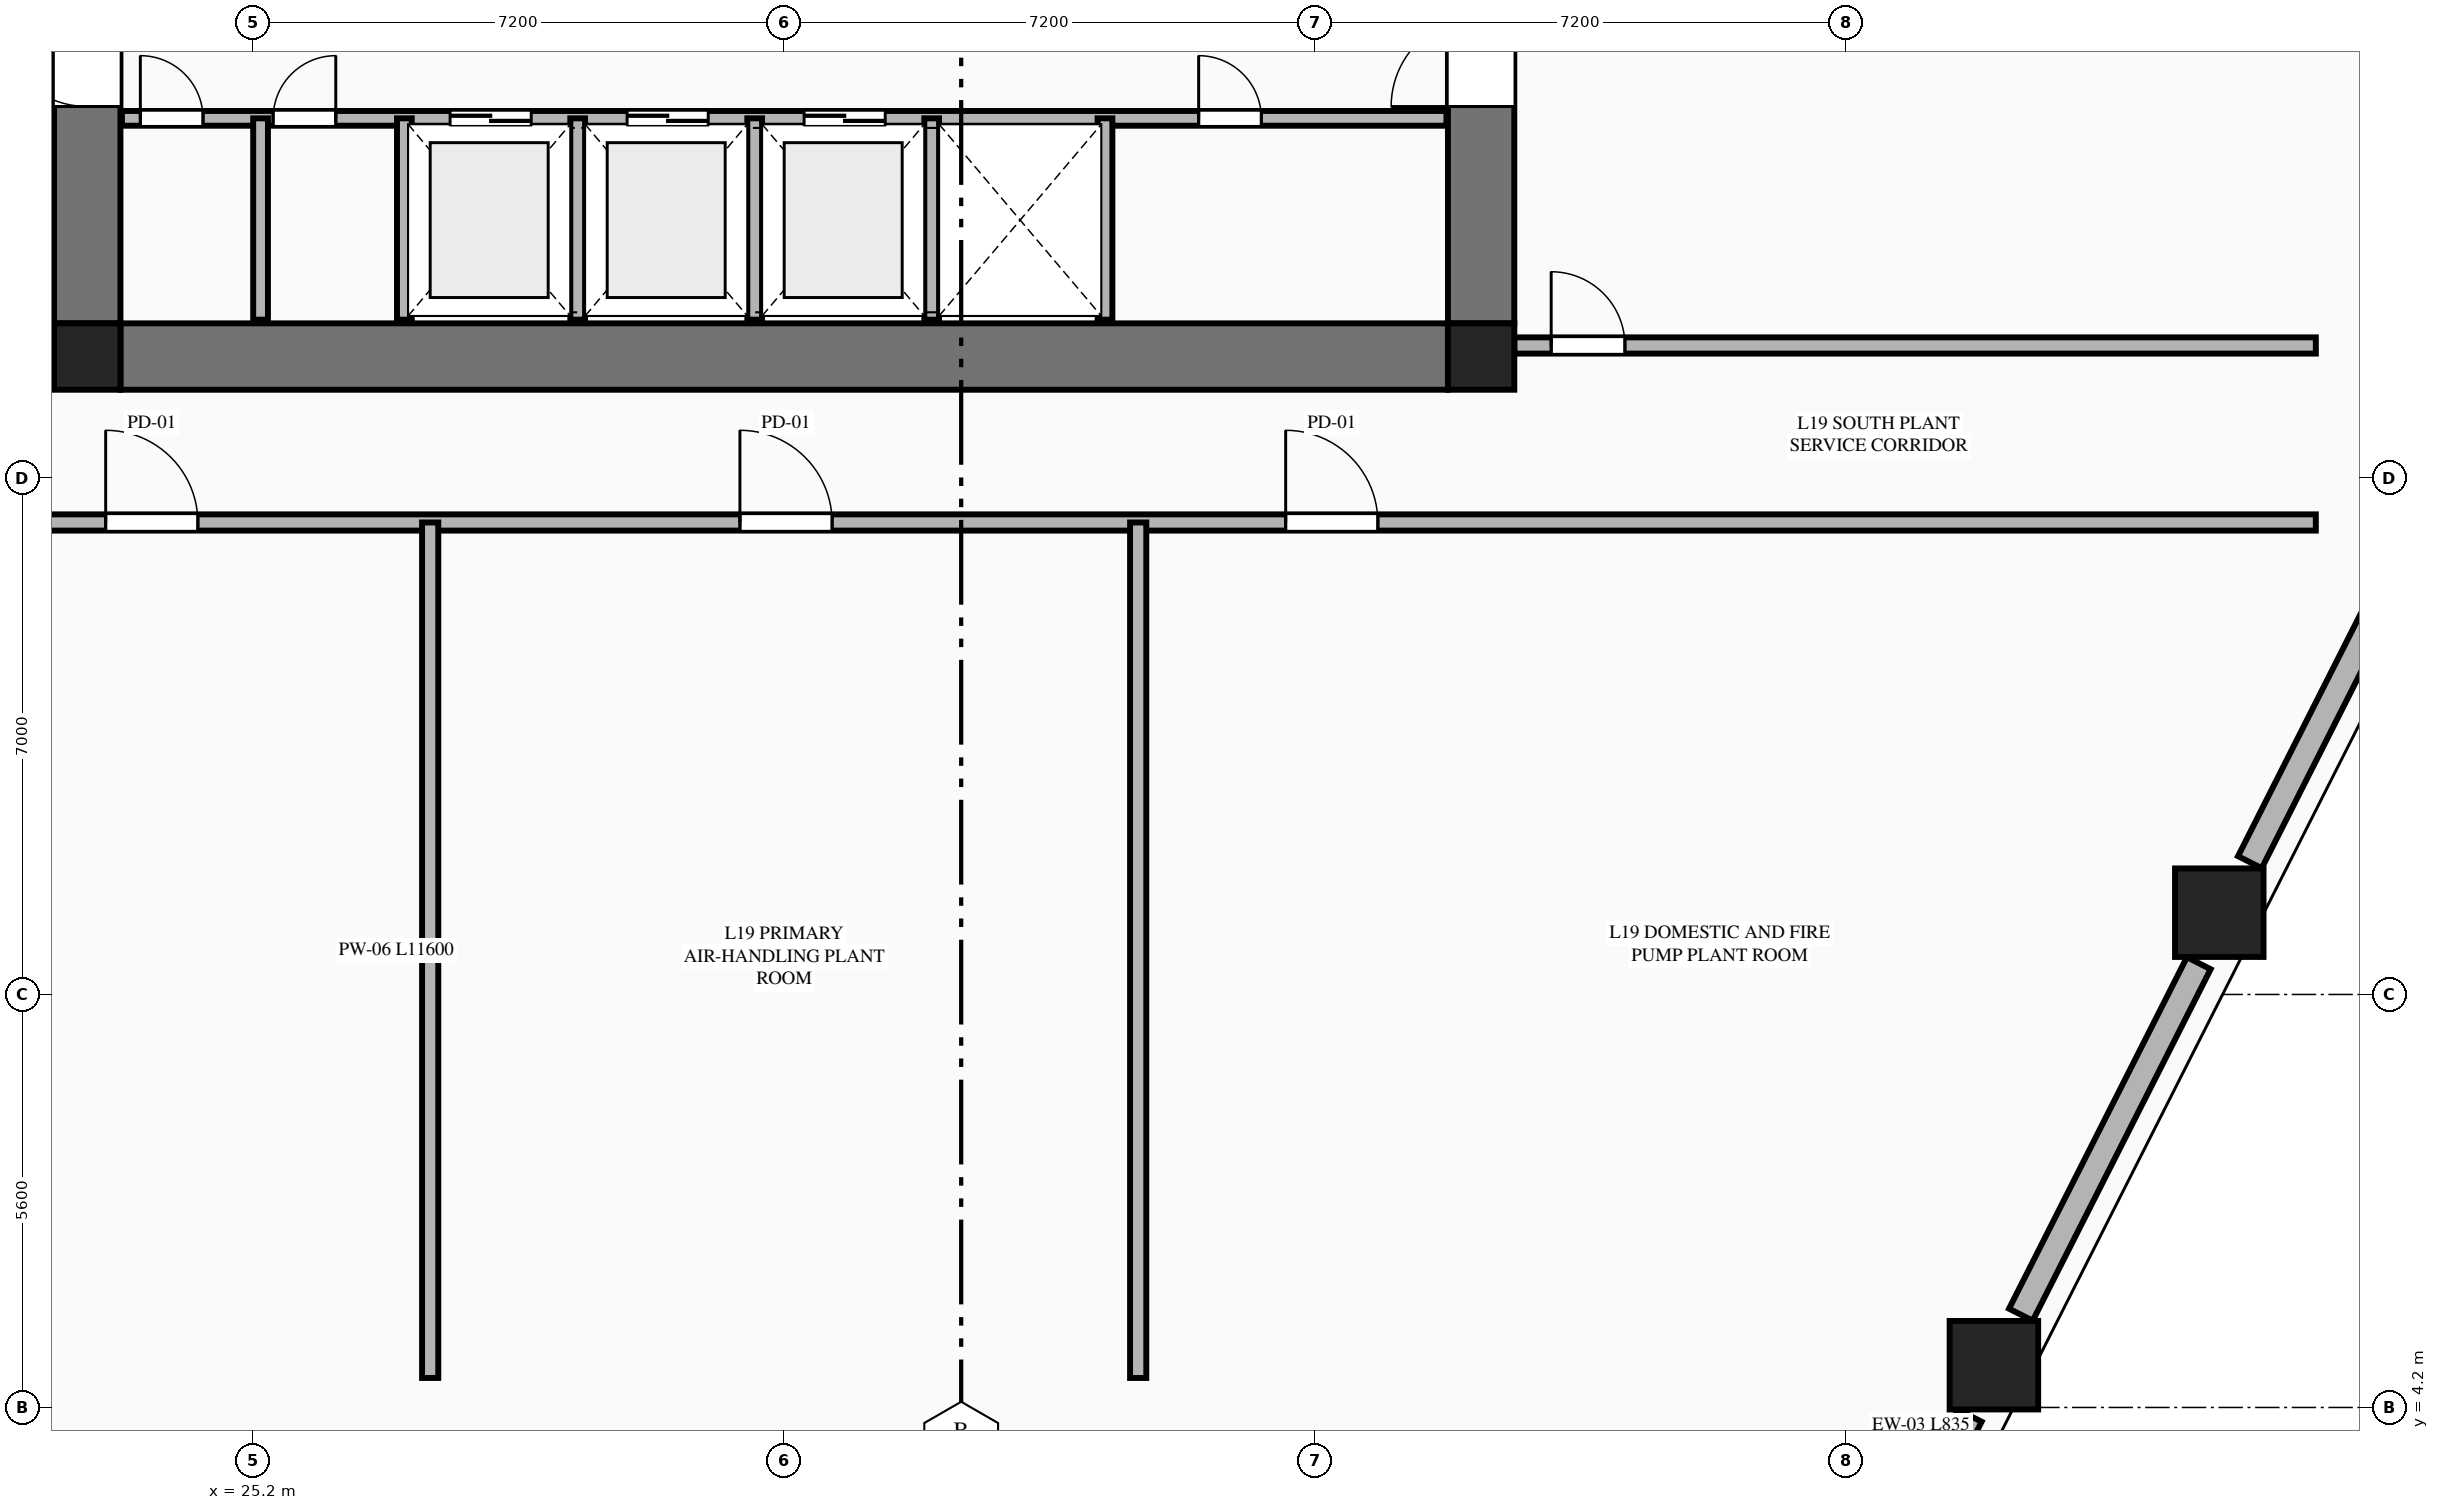
"""IFC4 building model, lengths in metres.
Left out: names, types, materials, properties, quantities, classifications, styles, units other than length and angle.
Written with IfcOpenShell. Run it as: python <this file> out.ifc"""

import sys

from ifc_helpers import new_model, si_unit, direction, frame, frame_2d, origin, origin_2d, place, context, subcontext, project, spatial, rectangle, extrude, element, fill, save


model = new_model("IFC4")
c1 = context("Model", 3, precision=1e-05, world=origin(), true_north=direction((0.0, 1.0)))
c2 = subcontext(c1, "Body", "Model", "MODEL_VIEW")
j1 = project(units=[si_unit("LENGTHUNIT", "METRE"), si_unit("PLANEANGLEUNIT", "RADIAN")], contexts=[c1])
p1 = place(None, origin())
s1 = spatial("IfcSite", under=j1, at=p1, CompositionType="ELEMENT")
p2 = place(p1, origin())
s2 = spatial("IfcBuilding", under=s1, at=p2, CompositionType="ELEMENT")
p3 = place(p2, frame((0.0, 0.0, 74.6)))
s3 = spatial("IfcBuildingStorey", under=s2, at=p3, CompositionType="ELEMENT", Elevation=74.6)
for number, where, z_axis, x_axis in (
    (1, (22.95, 18.45, 0.0), (0.0, 0.0, 1.0), (1.0, 0.0, 0.0)),
    (2, (41.85, 18.45, 0.0), (0.0, 0.0, 1.0), (1.0, 0.0, 0.0)),
):
    element("IfcColumn", number, at=place(p3, frame(where, z_axis=z_axis, x_axis=x_axis)), inside=s3, PredefinedType="COLUMN", context=c2, shape_type="SweptSolid", body=[
        extrude(rectangle(XDim=0.9, YDim=0.9, at=origin_2d()), origin(), (0.0, 0.0, 1.0), 5.4),
    ])
p4 = place(p3, frame((23.4, 18.45, 0.0), z_axis=(0.0, 0.0, 1.0), x_axis=(1.0, 0.0, 0.0)))
e3 = element("IfcWall", 3, at=p4, inside=s3, PredefinedType="SHEAR", context=c2, shape_type="SweptSolid", body=[
    extrude(rectangle(XDim=18.0, YDim=0.9, at=frame_2d((9.0, 0.0))), origin(), (0.0, 0.0, 1.0), 5.18),
])
p5 = place(p3, frame((22.95, 18.9, 0.0), z_axis=(0.0, 0.0, 1.0), x_axis=(0.0, 1.0, 0.0)))
e4 = element("IfcWall", 4, at=p5, inside=s3, PredefinedType="SHEAR", context=c2, shape_type="SweptSolid", body=[
    extrude(rectangle(XDim=14.0, YDim=0.9, at=frame_2d((7.0, 0.0))), origin(), (0.0, 0.0, 1.0), 5.18),
])
p6 = place(p5, frame((2.94, 0.0, 0.0)))
e5 = element("IfcOpeningElement", 5, at=p6, cuts=e4, PredefinedType="OPENING", context=c2, shape_type="SweptSolid", body=[
    extrude(rectangle(XDim=1.22, YDim=2.25, at=frame_2d((0.61, 1.125))), frame((0.0, 0.46, 0.0), z_axis=(0.0, -1.0, 0.0), x_axis=(1.0, 0.0, 0.0)), (0.0, 0.0, 1.0), 0.92),
])
p7 = place(p3, frame((41.85, 18.9, 0.0), z_axis=(0.0, 0.0, 1.0), x_axis=(0.0, 1.0, 0.0)))
e6 = element("IfcWall", 6, at=p7, inside=s3, PredefinedType="SHEAR", context=c2, shape_type="SweptSolid", body=[
    extrude(rectangle(XDim=14.0, YDim=0.9, at=frame_2d((7.0, 0.0))), origin(), (0.0, 0.0, 1.0), 5.18),
])
p8 = place(p7, frame((2.94, 0.0, 0.0)))
e7 = element("IfcOpeningElement", 7, at=p8, cuts=e6, PredefinedType="OPENING", context=c2, shape_type="SweptSolid", body=[
    extrude(rectangle(XDim=1.22, YDim=2.25, at=frame_2d((0.61, 1.125))), frame((0.0, 0.46, 0.0), z_axis=(0.0, -1.0, 0.0), x_axis=(1.0, 0.0, 0.0)), (0.0, 0.0, 1.0), 0.92),
])
for number, where, z_axis, x_axis in (
    (8, (48.803, 4.773, 0.0), (0.0, 0.0, 1.0), (1.0, 0.0, 0.0)),
    (9, (51.859, 10.909, 0.0), (0.0, 0.0, 1.0), (1.0, 0.0, 0.0)),
):
    element("IfcColumn", number, at=place(p3, frame(where, z_axis=z_axis, x_axis=x_axis)), inside=s3, PredefinedType="COLUMN", context=c2, shape_type="SweptSolid", body=[
        extrude(rectangle(XDim=1.2, YDim=1.2, at=origin_2d()), origin(), (0.0, 0.0, 1.0), 5.4),
    ])
p9 = place(p3, frame((23.42, 21.68, 0.0), z_axis=(0.0, 0.0, 1.0), x_axis=(1.0, 0.0, 0.0)))
e10 = element("IfcWall", 10, at=p9, inside=s3, PredefinedType="PLUMBINGWALL", context=c2, shape_type="SweptSolid", body=[
    extrude(rectangle(XDim=17.96, YDim=0.2, at=frame_2d((8.98, 0.0))), origin(), (0.0, 0.0, 1.0), 5.18),
])
p10 = place(p9, frame((4.45, 0.0, 0.0)))
e11 = element("IfcOpeningElement", 11, at=p10, cuts=e10, PredefinedType="OPENING", context=c2, shape_type="SweptSolid", body=[
    extrude(rectangle(XDim=1.1, YDim=2.2, at=frame_2d((0.55, 1.1))), frame((0.0, 0.11, 0.0), z_axis=(0.0, -1.0, 0.0), x_axis=(1.0, 0.0, 0.0)), (0.0, 0.0, 1.0), 0.22),
])
p11 = place(p9, frame((6.85, 0.0, 0.0)))
e12 = element("IfcOpeningElement", 12, at=p11, cuts=e10, PredefinedType="OPENING", context=c2, shape_type="SweptSolid", body=[
    extrude(rectangle(XDim=1.1, YDim=2.2, at=frame_2d((0.55, 1.1))), frame((0.0, 0.11, 0.0), z_axis=(0.0, -1.0, 0.0), x_axis=(1.0, 0.0, 0.0)), (0.0, 0.0, 1.0), 0.22),
])
p12 = place(p9, frame((9.25, 0.0, 0.0)))
e13 = element("IfcOpeningElement", 13, at=p12, cuts=e10, PredefinedType="OPENING", context=c2, shape_type="SweptSolid", body=[
    extrude(rectangle(XDim=1.1, YDim=2.2, at=frame_2d((0.55, 1.1))), frame((0.0, 0.11, 0.0), z_axis=(0.0, -1.0, 0.0), x_axis=(1.0, 0.0, 0.0)), (0.0, 0.0, 1.0), 0.22),
])
p13 = place(p9, frame((0.25, 0.0, 0.0)))
e14 = element("IfcOpeningElement", 14, at=p13, cuts=e10, PredefinedType="OPENING", context=c2, shape_type="SweptSolid", body=[
    extrude(rectangle(XDim=0.85, YDim=2.05, at=frame_2d((0.425, 1.025))), frame((0.0, 0.11, 0.0), z_axis=(0.0, -1.0, 0.0), x_axis=(1.0, 0.0, 0.0)), (0.0, 0.0, 1.0), 0.22),
])
p14 = place(p9, frame((2.05, 0.0, 0.0)))
e15 = element("IfcOpeningElement", 15, at=p14, cuts=e10, PredefinedType="OPENING", context=c2, shape_type="SweptSolid", body=[
    extrude(rectangle(XDim=0.85, YDim=2.05, at=frame_2d((0.425, 1.025))), frame((0.0, 0.11, 0.0), z_axis=(0.0, -1.0, 0.0), x_axis=(1.0, 0.0, 0.0)), (0.0, 0.0, 1.0), 0.22),
])
p15 = place(p9, frame((14.6, 0.0, 0.0)))
e16 = element("IfcOpeningElement", 16, at=p15, cuts=e10, PredefinedType="OPENING", context=c2, shape_type="SweptSolid", body=[
    extrude(rectangle(XDim=0.85, YDim=2.05, at=frame_2d((0.425, 1.025))), frame((0.0, 0.11, 0.0), z_axis=(0.0, -1.0, 0.0), x_axis=(1.0, 0.0, 0.0)), (0.0, 0.0, 1.0), 0.22),
])
for number, where, z_axis, x_axis in (
    (17, (27.25, 18.95, 0.0), (0.0, 0.0, 1.0), (0.0, 1.0, 0.0)),
    (18, (29.6, 18.95, 0.0), (0.0, 0.0, 1.0), (0.0, 1.0, 0.0)),
    (19, (32.0, 18.95, 0.0), (0.0, 0.0, 1.0), (0.0, 1.0, 0.0)),
    (20, (34.4, 18.95, 0.0), (0.0, 0.0, 1.0), (0.0, 1.0, 0.0)),
    (21, (36.75, 18.95, 0.0), (0.0, 0.0, 1.0), (0.0, 1.0, 0.0)),
    (22, (25.3, 18.95, 0.0), (0.0, 0.0, 1.0), (0.0, 1.0, 0.0)),
):
    element("IfcWall", number, at=place(p3, frame(where, z_axis=z_axis, x_axis=x_axis)), inside=s3, PredefinedType="PLUMBINGWALL", context=c2, shape_type="SweptSolid", body=[
        extrude(rectangle(XDim=2.73, YDim=0.2, at=frame_2d((1.365, 0.0))), origin(), (0.0, 0.0, 1.0), 5.18),
    ])
p16 = place(p3, frame((11.632, 18.6, 0.0), z_axis=(0.0, 0.0, 1.0), x_axis=(1.0, 0.0, 0.0)))
e23 = element("IfcWall", 23, at=p16, inside=s3, PredefinedType="PARTITIONING", context=c2, shape_type="SweptSolid", body=[
    extrude(rectangle(XDim=10.868, YDim=0.22, at=frame_2d((5.434, 0.0))), origin(), (0.0, 0.0, 1.0), 4.487),
])
p17 = place(p16, frame((8.668, 0.0, 0.0)))
e24 = element("IfcOpeningElement", 24, at=p17, cuts=e23, PredefinedType="OPENING", context=c2, shape_type="SweptSolid", body=[
    extrude(rectangle(XDim=1.0, YDim=2.15, at=frame_2d((0.5, 1.075))), frame((0.0, 0.12, 0.0), z_axis=(0.0, -1.0, 0.0), x_axis=(1.0, 0.0, 0.0)), (0.0, 0.0, 1.0), 0.24),
])
p18 = place(p3, frame((42.3, 18.6, 0.0), z_axis=(0.0, 0.0, 1.0), x_axis=(1.0, 0.0, 0.0)))
e25 = element("IfcWall", 25, at=p18, inside=s3, PredefinedType="PARTITIONING", context=c2, shape_type="SweptSolid", body=[
    extrude(rectangle(XDim=10.868, YDim=0.22, at=frame_2d((5.434, 0.0))), origin(), (0.0, 0.0, 1.0), 4.487),
])
p19 = place(p18, frame((0.5, 0.0, 0.0)))
e26 = element("IfcOpeningElement", 26, at=p19, cuts=e25, PredefinedType="OPENING", context=c2, shape_type="SweptSolid", body=[
    extrude(rectangle(XDim=1.0, YDim=2.15, at=frame_2d((0.5, 1.075))), frame((0.0, 0.12, 0.0), z_axis=(0.0, -1.0, 0.0), x_axis=(1.0, 0.0, 0.0)), (0.0, 0.0, 1.0), 0.24),
])
p20 = place(p3, frame((11.632, 16.2, 0.0), z_axis=(0.0, 0.0, 1.0), x_axis=(1.0, 0.0, 0.0)))
e27 = element("IfcWall", 27, at=p20, inside=s3, PredefinedType="PARTITIONING", context=c2, shape_type="SweptSolid", body=[
    extrude(rectangle(XDim=41.536, YDim=0.22, at=frame_2d((20.768, 0.0))), origin(), (0.0, 0.0, 1.0), 5.18),
])
p21 = place(p20, frame((11.568, 0.0, 0.0)))
e28 = element("IfcOpeningElement", 28, at=p21, cuts=e27, PredefinedType="OPENING", context=c2, shape_type="SweptSolid", body=[
    extrude(rectangle(XDim=1.25, YDim=2.25, at=frame_2d((0.625, 1.125))), frame((0.0, 0.12, 0.0), z_axis=(0.0, -1.0, 0.0), x_axis=(1.0, 0.0, 0.0)), (0.0, 0.0, 1.0), 0.24),
])
p22 = place(p20, frame((20.168, 0.0, 0.0)))
e29 = element("IfcOpeningElement", 29, at=p22, cuts=e27, PredefinedType="OPENING", context=c2, shape_type="SweptSolid", body=[
    extrude(rectangle(XDim=1.25, YDim=2.25, at=frame_2d((0.625, 1.125))), frame((0.0, 0.12, 0.0), z_axis=(0.0, -1.0, 0.0), x_axis=(1.0, 0.0, 0.0)), (0.0, 0.0, 1.0), 0.24),
])
p23 = place(p20, frame((27.568, 0.0, 0.0)))
e30 = element("IfcOpeningElement", 30, at=p23, cuts=e27, PredefinedType="OPENING", context=c2, shape_type="SweptSolid", body=[
    extrude(rectangle(XDim=1.25, YDim=2.25, at=frame_2d((0.625, 1.125))), frame((0.0, 0.12, 0.0), z_axis=(0.0, -1.0, 0.0), x_axis=(1.0, 0.0, 0.0)), (0.0, 0.0, 1.0), 0.24),
])
for number, where, z_axis, x_axis in (
    (31, (27.6, 4.6, 0.0), (0.0, 0.0, 1.0), (0.0, 1.0, 0.0)),
    (32, (37.2, 4.6, 0.0), (0.0, 0.0, 1.0), (0.0, 1.0, 0.0)),
):
    element("IfcWall", number, at=place(p3, frame(where, z_axis=z_axis, x_axis=x_axis)), inside=s3, PredefinedType="PARTITIONING", context=c2, shape_type="SweptSolid", body=[
        extrude(rectangle(XDim=11.6, YDim=0.22, at=frame_2d((5.8, 0.0))), origin(), (0.0, 0.0, 1.0), 5.18),
    ])
p24 = place(p3, frame((48.099, 3.343, 0.0), z_axis=(0.0, 0.0, 1.0), x_axis=(0.45153655953, 0.892252618605, 0.0)))
e33 = element("IfcWall", 33, at=p24, inside=s3, PredefinedType="STANDARD", context=c2, shape_type="SweptSolid", body=[
    extrude(rectangle(XDim=0.835, YDim=0.36, at=frame_2d((0.417, 0.0))), origin(), (0.0, 0.0, 1.0), 5.18),
])
p25 = place(p3, frame((49.169, 5.458, 0.0), z_axis=(0.0, 0.0, 1.0), x_axis=(0.451559361714, 0.892241078884, 0.0)))
e34 = element("IfcWall", 34, at=p25, inside=s3, PredefinedType="STANDARD", context=c2, shape_type="SweptSolid", body=[
    extrude(rectangle(XDim=5.342, YDim=0.36, at=frame_2d((2.671, 0.0))), origin(), (0.0, 0.0, 1.0), 4.637),
])
p26 = place(p3, frame((52.274, 11.594, 0.0), z_axis=(0.0, 0.0, 1.0), x_axis=(0.451476366852, 0.892283077378, 0.0)))
e35 = element("IfcWall", 35, at=p26, inside=s3, PredefinedType="STANDARD", context=c2, shape_type="SweptSolid", body=[
    extrude(rectangle(XDim=5.537, YDim=0.36, at=frame_2d((2.769, 0.0))), origin(), (0.0, 0.0, 1.0), 4.637),
])
p27 = place(p6, origin())
e36 = element("IfcDoor", 36, at=p27, inside=s3, OperationType="SINGLE_SWING_RIGHT", PredefinedType="DOOR", context=c2, shape_type="SweptSolid", body=[
    extrude(rectangle(XDim=1.22, YDim=2.25, at=frame_2d((0.61, 1.125))), frame((0.0, 0.025, 0.0), z_axis=(0.0, -1.0, 0.0), x_axis=(1.0, 0.0, 0.0)), (0.0, 0.0, 1.0), 0.05),
])
fill(e5, e36)
p28 = place(p8, origin())
e37 = element("IfcDoor", 37, at=p28, inside=s3, OperationType="SINGLE_SWING_LEFT", PredefinedType="DOOR", context=c2, shape_type="SweptSolid", body=[
    extrude(rectangle(XDim=1.22, YDim=2.25, at=frame_2d((0.61, 1.125))), frame((0.0, 0.025, 0.0), z_axis=(0.0, -1.0, 0.0), x_axis=(1.0, 0.0, 0.0)), (0.0, 0.0, 1.0), 0.05),
])
fill(e7, e37)
p29 = place(p10, origin())
e38 = element("IfcDoor", 38, at=p29, inside=s3, OperationType="DOUBLE_DOOR_SLIDING", PredefinedType="DOOR", context=c2, shape_type="SweptSolid", body=[
    extrude(rectangle(XDim=1.1, YDim=2.2, at=frame_2d((0.55, 1.1))), frame((0.0, 0.025, 0.0), z_axis=(0.0, -1.0, 0.0), x_axis=(1.0, 0.0, 0.0)), (0.0, 0.0, 1.0), 0.05),
])
fill(e11, e38)
p30 = place(p11, origin())
e39 = element("IfcDoor", 39, at=p30, inside=s3, OperationType="DOUBLE_DOOR_SLIDING", PredefinedType="DOOR", context=c2, shape_type="SweptSolid", body=[
    extrude(rectangle(XDim=1.1, YDim=2.2, at=frame_2d((0.55, 1.1))), frame((0.0, 0.025, 0.0), z_axis=(0.0, -1.0, 0.0), x_axis=(1.0, 0.0, 0.0)), (0.0, 0.0, 1.0), 0.05),
])
fill(e12, e39)
p31 = place(p12, origin())
e40 = element("IfcDoor", 40, at=p31, inside=s3, OperationType="DOUBLE_DOOR_SLIDING", PredefinedType="DOOR", context=c2, shape_type="SweptSolid", body=[
    extrude(rectangle(XDim=1.1, YDim=2.2, at=frame_2d((0.55, 1.1))), frame((0.0, 0.025, 0.0), z_axis=(0.0, -1.0, 0.0), x_axis=(1.0, 0.0, 0.0)), (0.0, 0.0, 1.0), 0.05),
])
fill(e13, e40)
p32 = place(p13, origin())
e41 = element("IfcDoor", 41, at=p32, inside=s3, OperationType="SINGLE_SWING_LEFT", PredefinedType="DOOR", context=c2, shape_type="SweptSolid", body=[
    extrude(rectangle(XDim=0.85, YDim=2.05, at=frame_2d((0.425, 1.025))), frame((0.0, 0.025, 0.0), z_axis=(0.0, -1.0, 0.0), x_axis=(1.0, 0.0, 0.0)), (0.0, 0.0, 1.0), 0.05),
])
fill(e14, e41)
p33 = place(p14, origin())
e42 = element("IfcDoor", 42, at=p33, inside=s3, OperationType="SINGLE_SWING_RIGHT", PredefinedType="DOOR", context=c2, shape_type="SweptSolid", body=[
    extrude(rectangle(XDim=0.85, YDim=2.05, at=frame_2d((0.425, 1.025))), frame((0.0, 0.025, 0.0), z_axis=(0.0, -1.0, 0.0), x_axis=(1.0, 0.0, 0.0)), (0.0, 0.0, 1.0), 0.05),
])
fill(e15, e42)
p34 = place(p15, origin())
e43 = element("IfcDoor", 43, at=p34, inside=s3, OperationType="SINGLE_SWING_LEFT", PredefinedType="DOOR", context=c2, shape_type="SweptSolid", body=[
    extrude(rectangle(XDim=0.85, YDim=2.05, at=frame_2d((0.425, 1.025))), frame((0.0, 0.025, 0.0), z_axis=(0.0, -1.0, 0.0), x_axis=(1.0, 0.0, 0.0)), (0.0, 0.0, 1.0), 0.05),
])
fill(e16, e43)
p35 = place(p19, origin())
e44 = element("IfcDoor", 44, at=p35, inside=s3, OperationType="SINGLE_SWING_LEFT", PredefinedType="DOOR", context=c2, shape_type="SweptSolid", body=[
    extrude(rectangle(XDim=1.0, YDim=2.15, at=frame_2d((0.5, 1.075))), frame((0.0, 0.025, 0.0), z_axis=(0.0, -1.0, 0.0), x_axis=(1.0, 0.0, 0.0)), (0.0, 0.0, 1.0), 0.05),
])
fill(e26, e44)
p36 = place(p21, origin())
e45 = element("IfcDoor", 45, at=p36, inside=s3, OperationType="SINGLE_SWING_LEFT", PredefinedType="DOOR", context=c2, shape_type="SweptSolid", body=[
    extrude(rectangle(XDim=1.25, YDim=2.25, at=frame_2d((0.625, 1.125))), frame((0.0, 0.025, 0.0), z_axis=(0.0, -1.0, 0.0), x_axis=(1.0, 0.0, 0.0)), (0.0, 0.0, 1.0), 0.05),
])
fill(e28, e45)
p37 = place(p22, origin())
e46 = element("IfcDoor", 46, at=p37, inside=s3, OperationType="SINGLE_SWING_LEFT", PredefinedType="DOOR", context=c2, shape_type="SweptSolid", body=[
    extrude(rectangle(XDim=1.25, YDim=2.25, at=frame_2d((0.625, 1.125))), frame((0.0, 0.025, 0.0), z_axis=(0.0, -1.0, 0.0), x_axis=(1.0, 0.0, 0.0)), (0.0, 0.0, 1.0), 0.05),
])
fill(e29, e46)
p38 = place(p23, origin())
e47 = element("IfcDoor", 47, at=p38, inside=s3, OperationType="SINGLE_SWING_LEFT", PredefinedType="DOOR", context=c2, shape_type="SweptSolid", body=[
    extrude(rectangle(XDim=1.25, YDim=2.25, at=frame_2d((0.625, 1.125))), frame((0.0, 0.025, 0.0), z_axis=(0.0, -1.0, 0.0), x_axis=(1.0, 0.0, 0.0)), (0.0, 0.0, 1.0), 0.05),
])
fill(e30, e47)
save(model, sys.argv[1])
